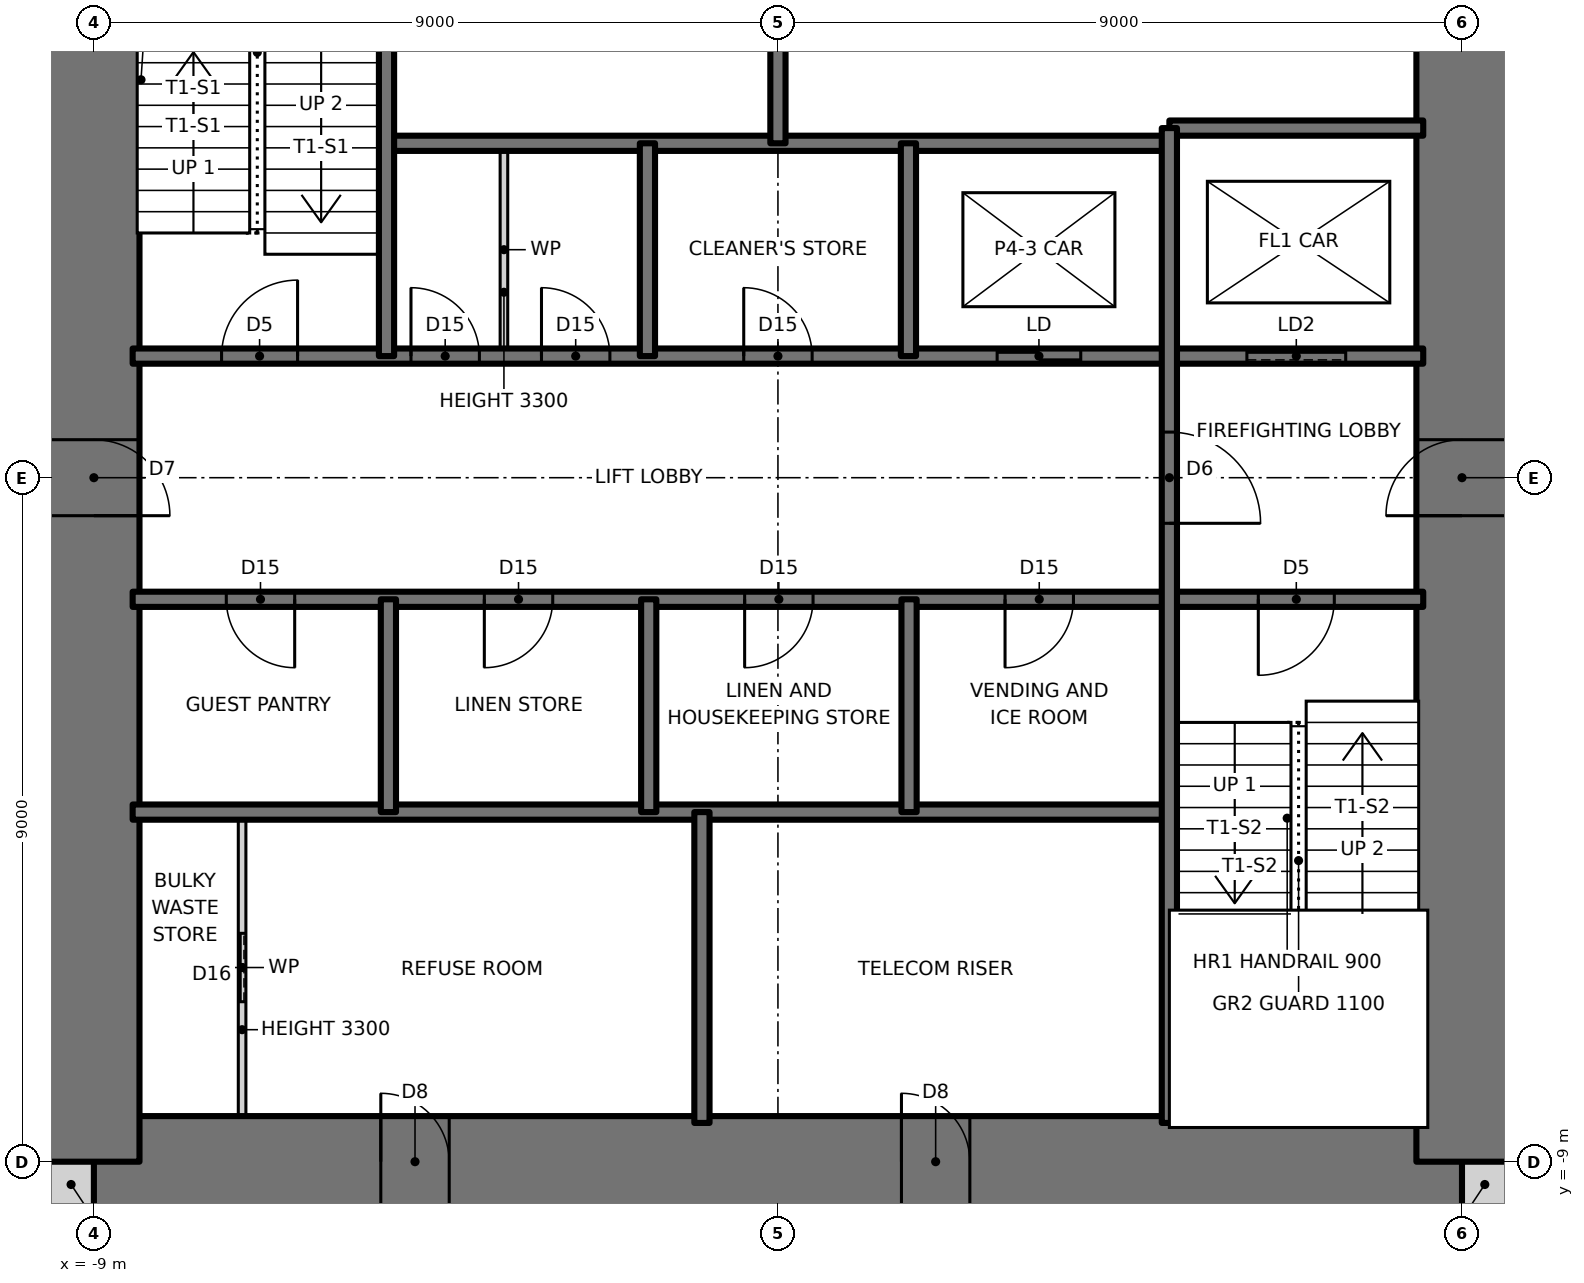
"""IFC4 building model, lengths in metres.
Left out: names, types, materials, properties, quantities, classifications, styles, units other than length and angle.
Written with IfcOpenShell. Run it as: python <this file> out.ifc"""

import sys

from ifc_helpers import new_model, si_unit, direction, frame, frame_2d, origin, place, context, subcontext, project, spatial, rectangle, extrude, element, fill, save


model = new_model("IFC4")
c1 = context("Model", 3, precision=1e-05, world=origin(), true_north=direction((0.0, 1.0)))
c2 = subcontext(c1, "Body", "Model", "MODEL_VIEW")
j1 = project(units=[si_unit("LENGTHUNIT", "METRE"), si_unit("PLANEANGLEUNIT", "RADIAN")], contexts=[c1])
p1 = place(None, origin())
s1 = spatial("IfcSite", under=j1, at=p1, CompositionType="ELEMENT")
p2 = place(p1, origin())
s2 = spatial("IfcBuilding", under=s1, at=p2, CompositionType="ELEMENT")
p3 = place(p2, frame((0.0, 0.0, 260.5)))
s3 = spatial("IfcBuildingStorey", under=s2, at=p3, CompositionType="ELEMENT", Elevation=260.5)
for number, where, z_axis, x_axis in (
    (1, (-9.6, -9.3, 0.0), (0.0, 0.0, 1.0), (1.0, 0.0, 0.0)),
    (2, (9.0, -9.3, 0.0), (0.0, 0.0, 1.0), (1.0, 0.0, 0.0)),
):
    element("IfcWall", number, at=place(p3, frame(where, z_axis=z_axis, x_axis=x_axis)), inside=s3, PredefinedType="SOLIDWALL", context=c2, shape_type="SweptSolid", body=[
        extrude(rectangle(XDim=0.6, YDim=0.6, at=frame_2d((0.3, 0.0))), origin(), (0.0, 0.0, 1.0), 3.5),
    ])
p4 = place(p3, frame((-9.0, -9.0, 0.0), z_axis=(0.0, 0.0, 1.0), x_axis=(1.0, 0.0, 0.0)))
e3 = element("IfcWall", 3, at=p4, inside=s3, PredefinedType="SHEAR", context=c2, shape_type="SweptSolid", body=[
    extrude(rectangle(XDim=18.0, YDim=1.2, at=frame_2d((9.0, 0.0))), origin(), (0.0, 0.0, 1.0), 3.5),
])
p5 = place(p4, frame((3.775, 0.0, 0.0)))
e4 = element("IfcOpeningElement", 4, at=p5, cuts=e3, PredefinedType="OPENING", context=c2, shape_type="SweptSolid", body=[
    extrude(rectangle(XDim=0.9, YDim=2.1, at=frame_2d((0.45, 1.05))), frame((0.0, 0.61, 0.0), z_axis=(0.0, -1.0, 0.0), x_axis=(1.0, 0.0, 0.0)), (0.0, 0.0, 1.0), 1.22),
])
p6 = place(p4, frame((10.625, 0.0, 0.0)))
e5 = element("IfcOpeningElement", 5, at=p6, cuts=e3, PredefinedType="OPENING", context=c2, shape_type="SweptSolid", body=[
    extrude(rectangle(XDim=0.9, YDim=2.1, at=frame_2d((0.45, 1.05))), frame((0.0, 0.61, 0.0), z_axis=(0.0, -1.0, 0.0), x_axis=(1.0, 0.0, 0.0)), (0.0, 0.0, 1.0), 1.22),
])
p7 = place(p3, frame((9.0, -9.0, 0.0), z_axis=(0.0, 0.0, 1.0), x_axis=(0.0, 1.0, 0.0)))
e6 = element("IfcWall", 6, at=p7, inside=s3, PredefinedType="SHEAR", context=c2, shape_type="SweptSolid", body=[
    extrude(rectangle(XDim=18.0, YDim=1.2, at=frame_2d((9.0, 0.0))), origin(), (0.0, 0.0, 1.0), 3.5),
])
p8 = place(p7, frame((8.5, 0.0, 0.0)))
e7 = element("IfcOpeningElement", 7, at=p8, cuts=e6, PredefinedType="OPENING", context=c2, shape_type="SweptSolid", body=[
    extrude(rectangle(XDim=1.0, YDim=2.1, at=frame_2d((0.5, 1.05))), frame((0.0, 0.61, 0.0), z_axis=(0.0, -1.0, 0.0), x_axis=(1.0, 0.0, 0.0)), (0.0, 0.0, 1.0), 1.22),
])
p9 = place(p3, frame((-9.0, 9.0, 0.0), z_axis=(0.0, 0.0, 1.0), x_axis=(0.0, -1.0, 0.0)))
e8 = element("IfcWall", 8, at=p9, inside=s3, PredefinedType="SHEAR", context=c2, shape_type="SweptSolid", body=[
    extrude(rectangle(XDim=18.0, YDim=1.2, at=frame_2d((9.0, 0.0))), origin(), (0.0, 0.0, 1.0), 3.5),
])
p10 = place(p9, frame((8.5, 0.0, 0.0)))
e9 = element("IfcOpeningElement", 9, at=p10, cuts=e8, PredefinedType="OPENING", context=c2, shape_type="SweptSolid", body=[
    extrude(rectangle(XDim=1.0, YDim=2.1, at=frame_2d((0.5, 1.05))), frame((0.0, 0.61, 0.0), z_axis=(0.0, -1.0, 0.0), x_axis=(1.0, 0.0, 0.0)), (0.0, 0.0, 1.0), 1.22),
])
p11 = place(p3, frame((-8.49, -4.4, 0.0), z_axis=(0.0, 0.0, 1.0), x_axis=(1.0, 0.0, 0.0)))
e10 = element("IfcWall", 10, at=p11, inside=s3, PredefinedType="SOLIDWALL", context=c2, shape_type="SweptSolid", body=[
    extrude(rectangle(XDim=13.64, YDim=0.2, at=frame_2d((6.82, 0.0))), origin(), (0.0, 0.0, 1.0), 3.5),
])
p12 = place(p3, frame((-8.49, -1.6, 0.0), z_axis=(0.0, 0.0, 1.0), x_axis=(1.0, 0.0, 0.0)))
e11 = element("IfcWall", 11, at=p12, inside=s3, PredefinedType="SOLIDWALL", context=c2, shape_type="SweptSolid", body=[
    extrude(rectangle(XDim=16.98, YDim=0.2, at=frame_2d((8.49, 0.0))), origin(), (0.0, 0.0, 1.0), 3.5),
])
p13 = place(p12, frame((14.81, 0.0, 0.0)))
e12 = element("IfcOpeningElement", 12, at=p13, cuts=e11, PredefinedType="OPENING", context=c2, shape_type="SweptSolid", body=[
    extrude(rectangle(XDim=1.0, YDim=2.1, at=frame_2d((0.5, 1.05))), frame((0.0, 0.11, 0.0), z_axis=(0.0, -1.0, 0.0), x_axis=(1.0, 0.0, 0.0)), (0.0, 0.0, 1.0), 0.22),
])
p14 = place(p12, frame((1.232, 0.0, 0.0)))
e13 = element("IfcOpeningElement", 13, at=p14, cuts=e11, PredefinedType="OPENING", context=c2, shape_type="SweptSolid", body=[
    extrude(rectangle(XDim=0.9, YDim=2.1, at=frame_2d((0.45, 1.05))), frame((0.0, 0.11, 0.0), z_axis=(0.0, -1.0, 0.0), x_axis=(1.0, 0.0, 0.0)), (0.0, 0.0, 1.0), 0.22),
])
p15 = place(p12, frame((4.627, 0.0, 0.0)))
e14 = element("IfcOpeningElement", 14, at=p15, cuts=e11, PredefinedType="OPENING", context=c2, shape_type="SweptSolid", body=[
    extrude(rectangle(XDim=0.9, YDim=2.1, at=frame_2d((0.45, 1.05))), frame((0.0, 0.11, 0.0), z_axis=(0.0, -1.0, 0.0), x_axis=(1.0, 0.0, 0.0)), (0.0, 0.0, 1.0), 0.22),
])
p16 = place(p12, frame((8.052, 0.0, 0.0)))
e15 = element("IfcOpeningElement", 15, at=p16, cuts=e11, PredefinedType="OPENING", context=c2, shape_type="SweptSolid", body=[
    extrude(rectangle(XDim=0.9, YDim=2.1, at=frame_2d((0.45, 1.05))), frame((0.0, 0.11, 0.0), z_axis=(0.0, -1.0, 0.0), x_axis=(1.0, 0.0, 0.0)), (0.0, 0.0, 1.0), 0.22),
])
p17 = place(p12, frame((11.478, 0.0, 0.0)))
e16 = element("IfcOpeningElement", 16, at=p17, cuts=e11, PredefinedType="OPENING", context=c2, shape_type="SweptSolid", body=[
    extrude(rectangle(XDim=0.9, YDim=2.1, at=frame_2d((0.45, 1.05))), frame((0.0, 0.11, 0.0), z_axis=(0.0, -1.0, 0.0), x_axis=(1.0, 0.0, 0.0)), (0.0, 0.0, 1.0), 0.22),
])
p18 = place(p3, frame((-8.49, 1.6, 0.0), z_axis=(0.0, 0.0, 1.0), x_axis=(1.0, 0.0, 0.0)))
e17 = element("IfcWall", 17, at=p18, inside=s3, PredefinedType="SOLIDWALL", context=c2, shape_type="SweptSolid", body=[
    extrude(rectangle(XDim=16.98, YDim=0.2, at=frame_2d((8.49, 0.0))), origin(), (0.0, 0.0, 1.0), 3.5),
])
p19 = place(p18, frame((1.17, 0.0, 0.0)))
e18 = element("IfcOpeningElement", 18, at=p19, cuts=e17, PredefinedType="OPENING", context=c2, shape_type="SweptSolid", body=[
    extrude(rectangle(XDim=1.0, YDim=2.1, at=frame_2d((0.5, 1.05))), frame((0.0, 0.11, 0.0), z_axis=(0.0, -1.0, 0.0), x_axis=(1.0, 0.0, 0.0)), (0.0, 0.0, 1.0), 0.22),
])
p20 = place(p18, frame((5.379, 0.0, 0.0)))
e19 = element("IfcOpeningElement", 19, at=p20, cuts=e17, PredefinedType="OPENING", context=c2, shape_type="SweptSolid", body=[
    extrude(rectangle(XDim=0.9, YDim=2.1, at=frame_2d((0.45, 1.05))), frame((0.0, 0.11, 0.0), z_axis=(0.0, -1.0, 0.0), x_axis=(1.0, 0.0, 0.0)), (0.0, 0.0, 1.0), 0.22),
])
p21 = place(p18, frame((3.662, 0.0, 0.0)))
e20 = element("IfcOpeningElement", 20, at=p21, cuts=e17, PredefinedType="OPENING", context=c2, shape_type="SweptSolid", body=[
    extrude(rectangle(XDim=0.9, YDim=2.1, at=frame_2d((0.45, 1.05))), frame((0.0, 0.11, 0.0), z_axis=(0.0, -1.0, 0.0), x_axis=(1.0, 0.0, 0.0)), (0.0, 0.0, 1.0), 0.22),
])
p22 = place(p18, frame((8.04, 0.0, 0.0)))
e21 = element("IfcOpeningElement", 21, at=p22, cuts=e17, PredefinedType="OPENING", context=c2, shape_type="SweptSolid", body=[
    extrude(rectangle(XDim=0.9, YDim=2.1, at=frame_2d((0.45, 1.05))), frame((0.0, 0.11, 0.0), z_axis=(0.0, -1.0, 0.0), x_axis=(1.0, 0.0, 0.0)), (0.0, 0.0, 1.0), 0.22),
])
p23 = place(p18, frame((11.374, 0.0, 0.0)))
e22 = element("IfcOpeningElement", 22, at=p23, cuts=e17, PredefinedType="OPENING", context=c2, shape_type="SweptSolid", body=[
    extrude(rectangle(XDim=1.1, YDim=2.1, at=frame_2d((0.55, 1.05))), frame((0.0, 0.11, 0.0), z_axis=(0.0, -1.0, 0.0), x_axis=(1.0, 0.0, 0.0)), (0.0, 0.0, 1.0), 0.22),
])
p24 = place(p18, frame((14.66, 0.0, 0.0)))
e23 = element("IfcOpeningElement", 23, at=p24, cuts=e17, PredefinedType="OPENING", context=c2, shape_type="SweptSolid", body=[
    extrude(rectangle(XDim=1.3, YDim=2.1, at=frame_2d((0.65, 1.05))), frame((0.0, 0.11, 0.0), z_axis=(0.0, -1.0, 0.0), x_axis=(1.0, 0.0, 0.0)), (0.0, 0.0, 1.0), 0.22),
])
p25 = place(p3, frame((-5.15, 4.4, 0.0), z_axis=(0.0, 0.0, 1.0), x_axis=(1.0, 0.0, 0.0)))
e24 = element("IfcWall", 24, at=p25, inside=s3, PredefinedType="SOLIDWALL", context=c2, shape_type="SweptSolid", body=[
    extrude(rectangle(XDim=10.3, YDim=0.2, at=frame_2d((5.15, 0.0))), origin(), (0.0, 0.0, 1.0), 3.5),
])
p26 = place(p3, frame((5.15, 4.6, 0.0), z_axis=(0.0, 0.0, 1.0), x_axis=(1.0, 0.0, 0.0)))
e25 = element("IfcWall", 25, at=p26, inside=s3, PredefinedType="SOLIDWALL", context=c2, shape_type="SweptSolid", body=[
    extrude(rectangle(XDim=3.34, YDim=0.2, at=frame_2d((1.67, 0.0))), origin(), (0.0, 0.0, 1.0), 3.5),
])
p27 = place(p3, frame((5.15, -8.49, 0.0), z_axis=(0.0, 0.0, 1.0), x_axis=(0.0, 1.0, 0.0)))
e26 = element("IfcWall", 26, at=p27, inside=s3, PredefinedType="SOLIDWALL", context=c2, shape_type="SweptSolid", body=[
    extrude(rectangle(XDim=13.09, YDim=0.2, at=frame_2d((6.545, 0.0))), origin(), (0.0, 0.0, 1.0), 3.5),
])
p28 = place(p27, frame((7.89, 0.0, 0.0)))
e27 = element("IfcOpeningElement", 27, at=p28, cuts=e26, PredefinedType="OPENING", context=c2, shape_type="SweptSolid", body=[
    extrude(rectangle(XDim=1.2, YDim=2.1, at=frame_2d((0.6, 1.05))), frame((0.0, 0.11, 0.0), z_axis=(0.0, -1.0, 0.0), x_axis=(1.0, 0.0, 0.0)), (0.0, 0.0, 1.0), 0.22),
])
for number, where, z_axis, x_axis in (
    (28, (1.725, -4.4, 0.0), (0.0, 0.0, 1.0), (0.0, 1.0, 0.0)),
    (29, (1.717, 1.6, 0.0), (0.0, 0.0, 1.0), (0.0, 1.0, 0.0)),
):
    element("IfcWall", number, at=place(p3, frame(where, z_axis=z_axis, x_axis=x_axis)), inside=s3, PredefinedType="SOLIDWALL", context=c2, shape_type="SweptSolid", body=[
        extrude(rectangle(XDim=2.8, YDim=0.2, at=frame_2d((1.4, 0.0))), origin(), (0.0, 0.0, 1.0), 3.5),
    ])
for number, where, z_axis, x_axis in (
    (30, (0.0, 4.4, 0.0), (0.0, 0.0, 1.0), (0.0, 1.0, 0.0)),
    (31, (-1.0, -8.49, 0.0), (0.0, 0.0, 1.0), (0.0, 1.0, 0.0)),
):
    element("IfcWall", number, at=place(p3, frame(where, z_axis=z_axis, x_axis=x_axis)), inside=s3, PredefinedType="SOLIDWALL", context=c2, shape_type="SweptSolid", body=[
        extrude(rectangle(XDim=4.09, YDim=0.2, at=frame_2d((2.045, 0.0))), origin(), (0.0, 0.0, 1.0), 3.5),
    ])
for number, where, z_axis, x_axis in (
    (32, (-1.7, -4.4, 0.0), (0.0, 0.0, 1.0), (0.0, 1.0, 0.0)),
    (33, (-1.717, 1.6, 0.0), (0.0, 0.0, 1.0), (0.0, 1.0, 0.0)),
):
    element("IfcWall", number, at=place(p3, frame(where, z_axis=z_axis, x_axis=x_axis)), inside=s3, PredefinedType="SOLIDWALL", context=c2, shape_type="SweptSolid", body=[
        extrude(rectangle(XDim=2.8, YDim=0.2, at=frame_2d((1.4, 0.0))), origin(), (0.0, 0.0, 1.0), 3.5),
    ])
p29 = place(p3, frame((-3.605, 1.6, 0.0), z_axis=(0.0, 0.0, 1.0), x_axis=(0.0, 1.0, 0.0)))
e34 = element("IfcWall", 34, at=p29, inside=s3, PredefinedType="PARTITIONING", context=c2, shape_type="SweptSolid", body=[
    extrude(rectangle(XDim=2.8, YDim=0.1, at=frame_2d((1.4, 0.0))), origin(), (0.0, 0.0, 1.0), 3.3),
])
p30 = place(p3, frame((-5.125, -4.4, 0.0), z_axis=(0.0, 0.0, 1.0), x_axis=(0.0, 1.0, 0.0)))
e35 = element("IfcWall", 35, at=p30, inside=s3, PredefinedType="SOLIDWALL", context=c2, shape_type="SweptSolid", body=[
    extrude(rectangle(XDim=2.8, YDim=0.2, at=frame_2d((1.4, 0.0))), origin(), (0.0, 0.0, 1.0), 3.5),
])
p31 = place(p3, frame((-5.15, 1.6, 0.0), z_axis=(0.0, 0.0, 1.0), x_axis=(0.0, 1.0, 0.0)))
e36 = element("IfcWall", 36, at=p31, inside=s3, PredefinedType="SOLIDWALL", context=c2, shape_type="SweptSolid", body=[
    extrude(rectangle(XDim=6.89, YDim=0.2, at=frame_2d((3.445, 0.0))), origin(), (0.0, 0.0, 1.0), 3.5),
])
p32 = place(p3, frame((-7.05, -8.49, 0.0), z_axis=(0.0, 0.0, 1.0), x_axis=(0.0, 1.0, 0.0)))
e37 = element("IfcWall", 37, at=p32, inside=s3, PredefinedType="PARTITIONING", context=c2, shape_type="SweptSolid", body=[
    extrude(rectangle(XDim=4.09, YDim=0.1, at=frame_2d((2.045, 0.0))), origin(), (0.0, 0.0, 1.0), 3.3),
])
p33 = place(p32, frame((1.595, 0.0, 0.0)))
e38 = element("IfcOpeningElement", 38, at=p33, cuts=e37, PredefinedType="OPENING", context=c2, shape_type="SweptSolid", body=[
    extrude(rectangle(XDim=0.9, YDim=2.1, at=frame_2d((0.45, 1.05))), frame((0.0, 0.06, 0.0), z_axis=(0.0, -1.0, 0.0), x_axis=(1.0, 0.0, 0.0)), (0.0, 0.0, 1.0), 0.12),
])
p34 = place(p19, origin())
e39 = element("IfcDoor", 39, at=p34, inside=s3, OperationType="SINGLE_SWING_RIGHT", PredefinedType="DOOR", context=c2, shape_type="SweptSolid", body=[
    extrude(rectangle(XDim=1.0, YDim=2.1, at=frame_2d((0.5, 1.05))), frame((0.0, 0.025, 0.0), z_axis=(0.0, -1.0, 0.0), x_axis=(1.0, 0.0, 0.0)), (0.0, 0.0, 1.0), 0.05),
])
fill(e18, e39)
p35 = place(p13, frame((1.0, 0.0, 0.0), z_axis=(0.0, 0.0, 1.0), x_axis=(-1.0, 0.0, 0.0)))
e40 = element("IfcDoor", 40, at=p35, inside=s3, OperationType="SINGLE_SWING_RIGHT", PredefinedType="DOOR", context=c2, shape_type="SweptSolid", body=[
    extrude(rectangle(XDim=1.0, YDim=2.1, at=frame_2d((0.5, 1.05))), frame((0.0, 0.025, 0.0), z_axis=(0.0, -1.0, 0.0), x_axis=(1.0, 0.0, 0.0)), (0.0, 0.0, 1.0), 0.05),
])
fill(e12, e40)
p36 = place(p28, frame((1.2, 0.0, 0.0), z_axis=(0.0, 0.0, 1.0), x_axis=(-1.0, 0.0, 0.0)))
e41 = element("IfcDoor", 41, at=p36, inside=s3, OperationType="SINGLE_SWING_RIGHT", PredefinedType="DOOR", context=c2, shape_type="SweptSolid", body=[
    extrude(rectangle(XDim=1.2, YDim=2.1, at=frame_2d((0.6, 1.05))), frame((0.0, 0.025, 0.0), z_axis=(0.0, -1.0, 0.0), x_axis=(1.0, 0.0, 0.0)), (0.0, 0.0, 1.0), 0.05),
])
fill(e27, e41)
p37 = place(p20, origin())
e42 = element("IfcDoor", 42, at=p37, inside=s3, OperationType="SINGLE_SWING_LEFT", PredefinedType="DOOR", context=c2, shape_type="SweptSolid", body=[
    extrude(rectangle(XDim=0.9, YDim=2.1, at=frame_2d((0.45, 1.05))), frame((0.0, 0.025, 0.0), z_axis=(0.0, -1.0, 0.0), x_axis=(1.0, 0.0, 0.0)), (0.0, 0.0, 1.0), 0.05),
])
fill(e19, e42)
p38 = place(p21, origin())
e43 = element("IfcDoor", 43, at=p38, inside=s3, OperationType="SINGLE_SWING_LEFT", PredefinedType="DOOR", context=c2, shape_type="SweptSolid", body=[
    extrude(rectangle(XDim=0.9, YDim=2.1, at=frame_2d((0.45, 1.05))), frame((0.0, 0.025, 0.0), z_axis=(0.0, -1.0, 0.0), x_axis=(1.0, 0.0, 0.0)), (0.0, 0.0, 1.0), 0.05),
])
fill(e20, e43)
p39 = place(p22, origin())
e44 = element("IfcDoor", 44, at=p39, inside=s3, OperationType="SINGLE_SWING_LEFT", PredefinedType="DOOR", context=c2, shape_type="SweptSolid", body=[
    extrude(rectangle(XDim=0.9, YDim=2.1, at=frame_2d((0.45, 1.05))), frame((0.0, 0.025, 0.0), z_axis=(0.0, -1.0, 0.0), x_axis=(1.0, 0.0, 0.0)), (0.0, 0.0, 1.0), 0.05),
])
fill(e21, e44)
p40 = place(p14, frame((0.9, 0.0, 0.0), z_axis=(0.0, 0.0, 1.0), x_axis=(-1.0, 0.0, 0.0)))
e45 = element("IfcDoor", 45, at=p40, inside=s3, OperationType="SINGLE_SWING_LEFT", PredefinedType="DOOR", context=c2, shape_type="SweptSolid", body=[
    extrude(rectangle(XDim=0.9, YDim=2.1, at=frame_2d((0.45, 1.05))), frame((0.0, 0.025, 0.0), z_axis=(0.0, -1.0, 0.0), x_axis=(1.0, 0.0, 0.0)), (0.0, 0.0, 1.0), 0.05),
])
fill(e13, e45)
p41 = place(p15, frame((0.9, 0.0, 0.0), z_axis=(0.0, 0.0, 1.0), x_axis=(-1.0, 0.0, 0.0)))
e46 = element("IfcDoor", 46, at=p41, inside=s3, OperationType="SINGLE_SWING_RIGHT", PredefinedType="DOOR", context=c2, shape_type="SweptSolid", body=[
    extrude(rectangle(XDim=0.9, YDim=2.1, at=frame_2d((0.45, 1.05))), frame((0.0, 0.025, 0.0), z_axis=(0.0, -1.0, 0.0), x_axis=(1.0, 0.0, 0.0)), (0.0, 0.0, 1.0), 0.05),
])
fill(e14, e46)
p42 = place(p16, frame((0.9, 0.0, 0.0), z_axis=(0.0, 0.0, 1.0), x_axis=(-1.0, 0.0, 0.0)))
e47 = element("IfcDoor", 47, at=p42, inside=s3, OperationType="SINGLE_SWING_RIGHT", PredefinedType="DOOR", context=c2, shape_type="SweptSolid", body=[
    extrude(rectangle(XDim=0.9, YDim=2.1, at=frame_2d((0.45, 1.05))), frame((0.0, 0.025, 0.0), z_axis=(0.0, -1.0, 0.0), x_axis=(1.0, 0.0, 0.0)), (0.0, 0.0, 1.0), 0.05),
])
fill(e15, e47)
p43 = place(p17, frame((0.9, 0.0, 0.0), z_axis=(0.0, 0.0, 1.0), x_axis=(-1.0, 0.0, 0.0)))
e48 = element("IfcDoor", 48, at=p43, inside=s3, OperationType="SINGLE_SWING_RIGHT", PredefinedType="DOOR", context=c2, shape_type="SweptSolid", body=[
    extrude(rectangle(XDim=0.9, YDim=2.1, at=frame_2d((0.45, 1.05))), frame((0.0, 0.025, 0.0), z_axis=(0.0, -1.0, 0.0), x_axis=(1.0, 0.0, 0.0)), (0.0, 0.0, 1.0), 0.05),
])
fill(e16, e48)
p44 = place(p33, origin())
e49 = element("IfcDoor", 49, at=p44, inside=s3, OperationType="SLIDING_TO_LEFT", PredefinedType="DOOR", context=c2, shape_type="SweptSolid", body=[
    extrude(rectangle(XDim=0.9, YDim=2.1, at=frame_2d((0.45, 1.05))), frame((0.0, 0.025, 0.0), z_axis=(0.0, -1.0, 0.0), x_axis=(1.0, 0.0, 0.0)), (0.0, 0.0, 1.0), 0.05),
])
fill(e38, e49)
p45 = place(p10, origin())
e50 = element("IfcDoor", 50, at=p45, inside=s3, OperationType="SINGLE_SWING_RIGHT", PredefinedType="DOOR", context=c2, shape_type="SweptSolid", body=[
    extrude(rectangle(XDim=1.0, YDim=2.1, at=frame_2d((0.5, 1.05))), frame((0.0, 0.025, 0.0), z_axis=(0.0, -1.0, 0.0), x_axis=(1.0, 0.0, 0.0)), (0.0, 0.0, 1.0), 0.05),
])
fill(e9, e50)
p46 = place(p8, origin())
e51 = element("IfcDoor", 51, at=p46, inside=s3, OperationType="SINGLE_SWING_LEFT", PredefinedType="DOOR", context=c2, shape_type="SweptSolid", body=[
    extrude(rectangle(XDim=1.0, YDim=2.1, at=frame_2d((0.5, 1.05))), frame((0.0, 0.025, 0.0), z_axis=(0.0, -1.0, 0.0), x_axis=(1.0, 0.0, 0.0)), (0.0, 0.0, 1.0), 0.05),
])
fill(e7, e51)
p47 = place(p5, origin())
e52 = element("IfcDoor", 52, at=p47, inside=s3, OperationType="SINGLE_SWING_LEFT", PredefinedType="DOOR", context=c2, shape_type="SweptSolid", body=[
    extrude(rectangle(XDim=0.9, YDim=2.1, at=frame_2d((0.45, 1.05))), frame((0.0, 0.025, 0.0), z_axis=(0.0, -1.0, 0.0), x_axis=(1.0, 0.0, 0.0)), (0.0, 0.0, 1.0), 0.05),
])
fill(e4, e52)
p48 = place(p6, origin())
e53 = element("IfcDoor", 53, at=p48, inside=s3, OperationType="SINGLE_SWING_LEFT", PredefinedType="DOOR", context=c2, shape_type="SweptSolid", body=[
    extrude(rectangle(XDim=0.9, YDim=2.1, at=frame_2d((0.45, 1.05))), frame((0.0, 0.025, 0.0), z_axis=(0.0, -1.0, 0.0), x_axis=(1.0, 0.0, 0.0)), (0.0, 0.0, 1.0), 0.05),
])
fill(e5, e53)
p49 = place(p23, origin())
e54 = element("IfcDoor", 54, at=p49, inside=s3, OperationType="DOUBLE_DOOR_SLIDING", PredefinedType="DOOR", context=c2, shape_type="SweptSolid", body=[
    extrude(rectangle(XDim=1.1, YDim=2.1, at=frame_2d((0.55, 1.05))), frame((0.0, 0.025, 0.0), z_axis=(0.0, -1.0, 0.0), x_axis=(1.0, 0.0, 0.0)), (0.0, 0.0, 1.0), 0.05),
])
fill(e22, e54)
p50 = place(p24, origin())
e55 = element("IfcDoor", 55, at=p50, inside=s3, OperationType="SLIDING_TO_LEFT", PredefinedType="DOOR", context=c2, shape_type="SweptSolid", body=[
    extrude(rectangle(XDim=1.3, YDim=2.1, at=frame_2d((0.65, 1.05))), frame((0.0, 0.025, 0.0), z_axis=(0.0, -1.0, 0.0), x_axis=(1.0, 0.0, 0.0)), (0.0, 0.0, 1.0), 0.05),
])
fill(e23, e55)
save(model, sys.argv[1])
